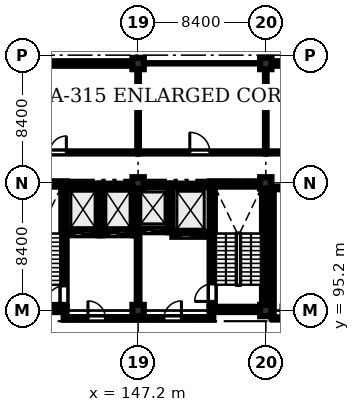
"""IFC4 building model, lengths in metres.
Left out: names, types, materials, properties, quantities, classifications, styles, units other than length and angle.
Written with IfcOpenShell. Run it as: python <this file> out.ifc"""

import sys

from ifc_helpers import new_model, si_unit, direction, frame, frame_2d, origin, origin_2d, place, context, subcontext, project, spatial, rectangle, extrude, element, fill, save


model = new_model("IFC4")
c1 = context("Model", 3, precision=1e-05, world=origin(), true_north=direction((0.0, 1.0)))
c2 = subcontext(c1, "Body", "Model", "MODEL_VIEW")
j1 = project(units=[si_unit("LENGTHUNIT", "METRE"), si_unit("PLANEANGLEUNIT", "RADIAN")], contexts=[c1])
p1 = place(None, origin())
s1 = spatial("IfcSite", under=j1, at=p1, CompositionType="ELEMENT")
p2 = place(p1, origin())
s2 = spatial("IfcBuilding", under=s1, at=p2, CompositionType="ELEMENT")
p3 = place(p2, frame((0.0, 0.0, 52.8)))
s3 = spatial("IfcBuildingStorey", under=s2, at=p3, CompositionType="ELEMENT", Elevation=52.8)
for number, where, z_axis, x_axis in (
    (1, (147.2, 95.2, 0.0), (0.0, 0.0, 1.0), (1.0, 0.0, 0.0)),
    (2, (147.2, 103.6, 0.0), (0.0, 0.0, 1.0), (1.0, 0.0, 0.0)),
    (3, (147.2, 111.45, 0.0), (0.0, 0.0, 1.0), (1.0, 0.0, 0.0)),
    (4, (155.6, 95.2, 0.0), (0.0, 0.0, 1.0), (1.0, 0.0, 0.0)),
    (5, (155.6, 103.6, 0.0), (0.0, 0.0, 1.0), (1.0, 0.0, 0.0)),
    (6, (155.6, 111.45, 0.0), (0.0, 0.0, 1.0), (1.0, 0.0, 0.0)),
):
    element("IfcColumn", number, at=place(p3, frame(where, z_axis=z_axis, x_axis=x_axis)), inside=s3, PredefinedType="COLUMN", context=c2, shape_type="SweptSolid", body=[
        extrude(rectangle(XDim=0.75, YDim=0.75, at=origin_2d()), origin(), (0.0, 0.0, 1.0), 4.03),
    ])
for number, where, z_axis, x_axis in (
    (7, (138.7, 95.275, 0.0), (0.0, 0.0, 1.0), (1.0, 0.0, 0.0)),
    (8, (138.7, 103.525, 0.0), (0.0, 0.0, 1.0), (1.0, 0.0, 0.0)),
):
    element("IfcWall", number, at=place(p3, frame(where, z_axis=z_axis, x_axis=x_axis)), inside=s3, PredefinedType="SHEAR", context=c2, shape_type="SweptSolid", body=[
        extrude(rectangle(XDim=3.8, YDim=0.35, at=frame_2d((1.9, 0.0))), origin(), (0.0, 0.0, 1.0), 4.03),
    ])
p4 = place(p3, frame((142.325, 95.45, 0.0), z_axis=(0.0, 0.0, 1.0), x_axis=(0.0, 1.0, 0.0)))
e9 = element("IfcWall", 9, at=p4, inside=s3, PredefinedType="SHEAR", context=c2, shape_type="SweptSolid", body=[
    extrude(rectangle(XDim=7.9, YDim=0.35, at=frame_2d((3.95, 0.0))), origin(), (0.0, 0.0, 1.0), 4.03),
])
p5 = place(p4, frame((0.22, 0.0, 0.0)))
e10 = element("IfcOpeningElement", 10, at=p5, cuts=e9, PredefinedType="OPENING", context=c2, shape_type="SweptSolid", body=[
    extrude(rectangle(XDim=1.15, YDim=2.15, at=frame_2d((0.575, 1.075))), frame((0.0, 0.185, 0.0), z_axis=(0.0, -1.0, 0.0), x_axis=(1.0, 0.0, 0.0)), (0.0, 0.0, 1.0), 0.37),
])
for number, where, z_axis, x_axis in (
    (11, (151.9, 95.275, 0.0), (0.0, 0.0, 1.0), (1.0, 0.0, 0.0)),
    (12, (151.9, 103.525, 0.0), (0.0, 0.0, 1.0), (1.0, 0.0, 0.0)),
):
    element("IfcWall", number, at=place(p3, frame(where, z_axis=z_axis, x_axis=x_axis)), inside=s3, PredefinedType="SHEAR", context=c2, shape_type="SweptSolid", body=[
        extrude(rectangle(XDim=3.8, YDim=0.35, at=frame_2d((1.9, 0.0))), origin(), (0.0, 0.0, 1.0), 4.03),
    ])
p6 = place(p3, frame((152.075, 95.45, 0.0), z_axis=(0.0, 0.0, 1.0), x_axis=(0.0, 1.0, 0.0)))
e13 = element("IfcWall", 13, at=p6, inside=s3, PredefinedType="SHEAR", context=c2, shape_type="SweptSolid", body=[
    extrude(rectangle(XDim=7.9, YDim=0.35, at=frame_2d((3.95, 0.0))), origin(), (0.0, 0.0, 1.0), 4.03),
])
p7 = place(p6, frame((0.35, 0.0, 0.0)))
e14 = element("IfcOpeningElement", 14, at=p7, cuts=e13, PredefinedType="OPENING", context=c2, shape_type="SweptSolid", body=[
    extrude(rectangle(XDim=1.15, YDim=2.15, at=frame_2d((0.575, 1.075))), frame((0.0, 0.185, 0.0), z_axis=(0.0, -1.0, 0.0), x_axis=(1.0, 0.0, 0.0)), (0.0, 0.0, 1.0), 0.37),
])
p8 = place(p3, frame((155.525, 95.45, 0.0), z_axis=(0.0, 0.0, 1.0), x_axis=(0.0, 1.0, 0.0)))
e15 = element("IfcWall", 15, at=p8, inside=s3, PredefinedType="SHEAR", context=c2, shape_type="SweptSolid", body=[
    extrude(rectangle(XDim=7.9, YDim=0.35, at=frame_2d((3.95, 0.0))), origin(), (0.0, 0.0, 1.0), 4.03),
])
p9 = place(p3, frame((142.5, 100.275, 0.0), z_axis=(0.0, 0.0, 1.0), x_axis=(1.0, 0.0, 0.0)))
e16 = element("IfcWall", 16, at=p9, inside=s3, PredefinedType="SHEAR", context=c2, shape_type="SweptSolid", body=[
    extrude(rectangle(XDim=2.1, YDim=0.25, at=frame_2d((1.05, 0.0))), origin(), (0.0, 0.0, 1.0), 4.03),
])
p10 = place(p9, frame((0.5, 0.0, 0.0)))
e17 = element("IfcOpeningElement", 17, at=p10, cuts=e16, PredefinedType="OPENING", context=c2, shape_type="SweptSolid", body=[
    extrude(rectangle(XDim=1.1, YDim=2.15, at=frame_2d((0.55, 1.075))), frame((0.0, 0.135, 0.0), z_axis=(0.0, -1.0, 0.0), x_axis=(1.0, 0.0, 0.0)), (0.0, 0.0, 1.0), 0.27),
])
p11 = place(p3, frame((142.5, 103.425, 0.0), z_axis=(0.0, 0.0, 1.0), x_axis=(1.0, 0.0, 0.0)))
e18 = element("IfcWall", 18, at=p11, inside=s3, PredefinedType="SHEAR", context=c2, shape_type="SweptSolid", body=[
    extrude(rectangle(XDim=2.1, YDim=0.25, at=frame_2d((1.05, 0.0))), origin(), (0.0, 0.0, 1.0), 4.03),
])
p12 = place(p3, frame((144.725, 100.15, 0.0), z_axis=(0.0, 0.0, 1.0), x_axis=(0.0, 1.0, 0.0)))
e19 = element("IfcWall", 19, at=p12, inside=s3, PredefinedType="SHEAR", context=c2, shape_type="SweptSolid", body=[
    extrude(rectangle(XDim=3.4, YDim=0.25, at=frame_2d((1.7, 0.0))), origin(), (0.0, 0.0, 1.0), 4.03),
])
p13 = place(p3, frame((144.85, 100.275, 0.0), z_axis=(0.0, 0.0, 1.0), x_axis=(1.0, 0.0, 0.0)))
e20 = element("IfcWall", 20, at=p13, inside=s3, PredefinedType="SHEAR", context=c2, shape_type="SweptSolid", body=[
    extrude(rectangle(XDim=2.05, YDim=0.25, at=frame_2d((1.025, 0.0))), origin(), (0.0, 0.0, 1.0), 4.03),
])
p14 = place(p13, frame((0.465, 0.0, 0.0)))
e21 = element("IfcOpeningElement", 21, at=p14, cuts=e20, PredefinedType="OPENING", context=c2, shape_type="SweptSolid", body=[
    extrude(rectangle(XDim=1.12, YDim=2.15, at=frame_2d((0.56, 1.075))), frame((0.0, 0.135, 0.0), z_axis=(0.0, -1.0, 0.0), x_axis=(1.0, 0.0, 0.0)), (0.0, 0.0, 1.0), 0.27),
])
p15 = place(p3, frame((144.85, 103.425, 0.0), z_axis=(0.0, 0.0, 1.0), x_axis=(1.0, 0.0, 0.0)))
e22 = element("IfcWall", 22, at=p15, inside=s3, PredefinedType="SHEAR", context=c2, shape_type="SweptSolid", body=[
    extrude(rectangle(XDim=2.05, YDim=0.25, at=frame_2d((1.025, 0.0))), origin(), (0.0, 0.0, 1.0), 4.03),
])
p16 = place(p3, frame((147.025, 100.15, 0.0), z_axis=(0.0, 0.0, 1.0), x_axis=(0.0, 1.0, 0.0)))
e23 = element("IfcWall", 23, at=p16, inside=s3, PredefinedType="SHEAR", context=c2, shape_type="SweptSolid", body=[
    extrude(rectangle(XDim=3.4, YDim=0.25, at=frame_2d((1.7, 0.0))), origin(), (0.0, 0.0, 1.0), 4.03),
])
p17 = place(p3, frame((147.15, 100.475, 0.0), z_axis=(0.0, 0.0, 1.0), x_axis=(1.0, 0.0, 0.0)))
e24 = element("IfcWall", 24, at=p17, inside=s3, PredefinedType="SHEAR", context=c2, shape_type="SweptSolid", body=[
    extrude(rectangle(XDim=2.05, YDim=0.25, at=frame_2d((1.025, 0.0))), origin(), (0.0, 0.0, 1.0), 4.03),
])
p18 = place(p17, frame((0.495, 0.0, 0.0)))
e25 = element("IfcOpeningElement", 25, at=p18, cuts=e24, PredefinedType="OPENING", context=c2, shape_type="SweptSolid", body=[
    extrude(rectangle(XDim=1.06, YDim=2.15, at=frame_2d((0.53, 1.075))), frame((0.0, 0.135, 0.0), z_axis=(0.0, -1.0, 0.0), x_axis=(1.0, 0.0, 0.0)), (0.0, 0.0, 1.0), 0.27),
])
p19 = place(p3, frame((147.15, 103.425, 0.0), z_axis=(0.0, 0.0, 1.0), x_axis=(1.0, 0.0, 0.0)))
e26 = element("IfcWall", 26, at=p19, inside=s3, PredefinedType="SHEAR", context=c2, shape_type="SweptSolid", body=[
    extrude(rectangle(XDim=2.05, YDim=0.25, at=frame_2d((1.025, 0.0))), origin(), (0.0, 0.0, 1.0), 4.03),
])
p20 = place(p3, frame((149.325, 100.35, 0.0), z_axis=(0.0, 0.0, 1.0), x_axis=(0.0, 1.0, 0.0)))
e27 = element("IfcWall", 27, at=p20, inside=s3, PredefinedType="SHEAR", context=c2, shape_type="SweptSolid", body=[
    extrude(rectangle(XDim=3.2, YDim=0.25, at=frame_2d((1.6, 0.0))), origin(), (0.0, 0.0, 1.0), 4.03),
])
p21 = place(p3, frame((149.45, 100.175, 0.0), z_axis=(0.0, 0.0, 1.0), x_axis=(1.0, 0.0, 0.0)))
e28 = element("IfcWall", 28, at=p21, inside=s3, PredefinedType="SHEAR", context=c2, shape_type="SweptSolid", body=[
    extrude(rectangle(XDim=2.45, YDim=0.25, at=frame_2d((1.225, 0.0))), origin(), (0.0, 0.0, 1.0), 4.03),
])
p22 = place(p21, frame((0.575, 0.0, 0.0)))
e29 = element("IfcOpeningElement", 29, at=p22, cuts=e28, PredefinedType="OPENING", context=c2, shape_type="SweptSolid", body=[
    extrude(rectangle(XDim=1.3, YDim=2.25, at=frame_2d((0.65, 1.125))), frame((0.0, 0.135, 0.0), z_axis=(0.0, -1.0, 0.0), x_axis=(1.0, 0.0, 0.0)), (0.0, 0.0, 1.0), 0.27),
])
p23 = place(p3, frame((149.45, 103.425, 0.0), z_axis=(0.0, 0.0, 1.0), x_axis=(1.0, 0.0, 0.0)))
e30 = element("IfcWall", 30, at=p23, inside=s3, PredefinedType="SHEAR", context=c2, shape_type="SweptSolid", body=[
    extrude(rectangle(XDim=2.45, YDim=0.25, at=frame_2d((1.225, 0.0))), origin(), (0.0, 0.0, 1.0), 4.03),
])
p24 = place(p3, frame((139.175, 111.45, 0.0), z_axis=(0.0, 0.0, 1.0), x_axis=(1.0, 0.0, 0.0)))
e31 = element("IfcWall", 31, at=p24, inside=s3, PredefinedType="STANDARD", context=c2, shape_type="SweptSolid", body=[
    extrude(rectangle(XDim=7.65, YDim=0.3, at=frame_2d((3.825, 0.0))), origin(), (0.0, 0.0, 1.0), 3.33),
])
p25 = place(p24, frame((0.85, 0.0, 0.9)))
e32 = element("IfcOpeningElement", 32, at=p25, cuts=e31, PredefinedType="OPENING", context=c2, shape_type="SweptSolid", body=[
    extrude(rectangle(XDim=1.9, YDim=2.1, at=frame_2d((0.95, 1.05))), frame((0.0, 0.16, 0.0), z_axis=(0.0, -1.0, 0.0), x_axis=(1.0, 0.0, 0.0)), (0.0, 0.0, 1.0), 0.32),
])
p26 = place(p24, frame((4.65, 0.0, 0.9)))
e33 = element("IfcOpeningElement", 33, at=p26, cuts=e31, PredefinedType="OPENING", context=c2, shape_type="SweptSolid", body=[
    extrude(rectangle(XDim=1.9, YDim=2.1, at=frame_2d((0.95, 1.05))), frame((0.0, 0.16, 0.0), z_axis=(0.0, -1.0, 0.0), x_axis=(1.0, 0.0, 0.0)), (0.0, 0.0, 1.0), 0.32),
])
p27 = place(p3, frame((155.975, 111.45, 0.0), z_axis=(0.0, 0.0, 1.0), x_axis=(1.0, 0.0, 0.0)))
e34 = element("IfcWall", 34, at=p27, inside=s3, PredefinedType="STANDARD", context=c2, shape_type="SweptSolid", body=[
    extrude(rectangle(XDim=7.1, YDim=0.3, at=frame_2d((3.55, 0.0))), origin(), (0.0, 0.0, 1.0), 3.33),
])
p28 = place(p27, frame((0.85, 0.0, 0.9)))
e35 = element("IfcOpeningElement", 35, at=p28, cuts=e34, PredefinedType="OPENING", context=c2, shape_type="SweptSolid", body=[
    extrude(rectangle(XDim=1.9, YDim=2.1, at=frame_2d((0.95, 1.05))), frame((0.0, 0.16, 0.0), z_axis=(0.0, -1.0, 0.0), x_axis=(1.0, 0.0, 0.0)), (0.0, 0.0, 1.0), 0.32),
])
p29 = place(p27, frame((4.65, 0.0, 0.9)))
e36 = element("IfcOpeningElement", 36, at=p29, cuts=e34, PredefinedType="OPENING", context=c2, shape_type="SweptSolid", body=[
    extrude(rectangle(XDim=1.9, YDim=2.1, at=frame_2d((0.95, 1.05))), frame((0.0, 0.16, 0.0), z_axis=(0.0, -1.0, 0.0), x_axis=(1.0, 0.0, 0.0)), (0.0, 0.0, 1.0), 0.32),
])
p30 = place(p3, frame((142.3, 94.68, 0.0), z_axis=(0.0, 0.0, 1.0), x_axis=(1.0, 0.0, 0.0)))
e37 = element("IfcWall", 37, at=p30, inside=s3, PredefinedType="STANDARD", context=c2, shape_type="SweptSolid", body=[
    extrude(rectangle(XDim=4.8, YDim=0.18, at=frame_2d((2.4, 0.0))), origin(), (0.0, 0.0, 1.0), 4.03),
])
p31 = place(p30, frame((1.6, 0.0, 0.0)))
e38 = element("IfcOpeningElement", 38, at=p31, cuts=e37, PredefinedType="OPENING", context=c2, shape_type="SweptSolid", body=[
    extrude(rectangle(XDim=1.15, YDim=2.15, at=frame_2d((0.575, 1.075))), frame((0.0, 0.1, 0.0), z_axis=(0.0, -1.0, 0.0), x_axis=(1.0, 0.0, 0.0)), (0.0, 0.0, 1.0), 0.2),
])
p32 = place(p3, frame((147.3, 94.68, 0.0), z_axis=(0.0, 0.0, 1.0), x_axis=(1.0, 0.0, 0.0)))
e39 = element("IfcWall", 39, at=p32, inside=s3, PredefinedType="STANDARD", context=c2, shape_type="SweptSolid", body=[
    extrude(rectangle(XDim=4.85, YDim=0.18, at=frame_2d((2.425, 0.0))), origin(), (0.0, 0.0, 1.0), 4.03),
])
p33 = place(p32, frame((1.6, 0.0, 0.0)))
e40 = element("IfcOpeningElement", 40, at=p33, cuts=e39, PredefinedType="OPENING", context=c2, shape_type="SweptSolid", body=[
    extrude(rectangle(XDim=1.15, YDim=2.15, at=frame_2d((0.575, 1.075))), frame((0.0, 0.1, 0.0), z_axis=(0.0, -1.0, 0.0), x_axis=(1.0, 0.0, 0.0)), (0.0, 0.0, 1.0), 0.2),
])
p34 = place(p3, frame((147.2, 95.75, 0.0), z_axis=(0.0, 0.0, 1.0), x_axis=(0.0, 1.0, 0.0)))
e41 = element("IfcWall", 41, at=p34, inside=s3, PredefinedType="STANDARD", context=c2, shape_type="SweptSolid", body=[
    extrude(rectangle(XDim=4.5, YDim=0.18, at=frame_2d((2.25, 0.0))), origin(), (0.0, 0.0, 1.0), 3.33),
])
p35 = place(p3, frame((156.05, 94.68, 0.0), z_axis=(0.0, 0.0, 1.0), x_axis=(1.0, 0.0, 0.0)))
e42 = element("IfcWall", 42, at=p35, inside=s3, PredefinedType="PARTITIONING", context=c2, shape_type="SweptSolid", body=[
    extrude(rectangle(XDim=7.15, YDim=0.15, at=frame_2d((3.575, 0.0))), origin(), (0.0, 0.0, 1.0), 4.03),
])
p36 = place(p35, frame((0.55, 0.0, 0.0)))
e43 = element("IfcOpeningElement", 43, at=p36, cuts=e42, PredefinedType="OPENING", context=c2, shape_type="SweptSolid", body=[
    extrude(rectangle(XDim=0.98, YDim=2.12, at=frame_2d((0.49, 1.06))), frame((0.0, 0.085, 0.0), z_axis=(0.0, -1.0, 0.0), x_axis=(1.0, 0.0, 0.0)), (0.0, 0.0, 1.0), 0.17),
])
p37 = place(p3, frame((156.05, 103.25, 0.0), z_axis=(0.0, 0.0, 1.0), x_axis=(1.0, 0.0, 0.0)))
e44 = element("IfcWall", 44, at=p37, inside=s3, PredefinedType="PARTITIONING", context=c2, shape_type="SweptSolid", body=[
    extrude(rectangle(XDim=7.15, YDim=0.15, at=frame_2d((3.575, 0.0))), origin(), (0.0, 0.0, 1.0), 4.03),
])
p38 = place(p3, frame((156.05, 94.68, 0.0), z_axis=(0.0, 0.0, 1.0), x_axis=(0.0, 1.0, 0.0)))
e45 = element("IfcWall", 45, at=p38, inside=s3, PredefinedType="PARTITIONING", context=c2, shape_type="SweptSolid", body=[
    extrude(rectangle(XDim=8.57, YDim=0.15, at=frame_2d((4.285, 0.0))), origin(), (0.0, 0.0, 1.0), 4.03),
])
p39 = place(p3, frame((134.6, 105.6, 0.0), z_axis=(0.0, 0.0, 1.0), x_axis=(1.0, 0.0, 0.0)))
e46 = element("IfcWall", 46, at=p39, inside=s3, PredefinedType="PARTITIONING", context=c2, shape_type="SweptSolid", body=[
    extrude(rectangle(XDim=12.6, YDim=0.145, at=frame_2d((6.3, 0.0))), origin(), (0.0, 0.0, 1.0), 4.03),
])
p40 = place(p39, frame((6.8, 0.0, 0.0)))
e47 = element("IfcOpeningElement", 47, at=p40, cuts=e46, PredefinedType="OPENING", context=c2, shape_type="SweptSolid", body=[
    extrude(rectangle(XDim=1.08, YDim=2.15, at=frame_2d((0.54, 1.075))), frame((0.0, 0.083, 0.0), z_axis=(0.0, -1.0, 0.0), x_axis=(1.0, 0.0, 0.0)), (0.0, 0.0, 1.0), 0.165),
])
p41 = place(p3, frame((147.2, 105.6, 0.0), z_axis=(0.0, 0.0, 1.0), x_axis=(1.0, 0.0, 0.0)))
e48 = element("IfcWall", 48, at=p41, inside=s3, PredefinedType="PARTITIONING", context=c2, shape_type="SweptSolid", body=[
    extrude(rectangle(XDim=8.4, YDim=0.145, at=frame_2d((4.2, 0.0))), origin(), (0.0, 0.0, 1.0), 4.03),
])
p42 = place(p41, frame((3.4, 0.0, 0.0)))
e49 = element("IfcOpeningElement", 49, at=p42, cuts=e48, PredefinedType="OPENING", context=c2, shape_type="SweptSolid", body=[
    extrude(rectangle(XDim=1.32, YDim=2.2, at=frame_2d((0.66, 1.1))), frame((0.0, 0.083, 0.0), z_axis=(0.0, -1.0, 0.0), x_axis=(1.0, 0.0, 0.0)), (0.0, 0.0, 1.0), 0.165),
])
p43 = place(p3, frame((147.2, 105.6, 0.0), z_axis=(0.0, 0.0, 1.0), x_axis=(0.0, 1.0, 0.0)))
e50 = element("IfcWall", 50, at=p43, inside=s3, PredefinedType="PARTITIONING", context=c2, shape_type="SweptSolid", body=[
    extrude(rectangle(XDim=5.75, YDim=0.112, at=frame_2d((2.875, 0.0))), origin(), (0.0, 0.0, 1.0), 3.33),
])
p44 = place(p3, frame((155.6, 105.6, 0.0), z_axis=(0.0, 0.0, 1.0), x_axis=(1.0, 0.0, 0.0)))
e51 = element("IfcWall", 51, at=p44, inside=s3, PredefinedType="PARTITIONING", context=c2, shape_type="SweptSolid", body=[
    extrude(rectangle(XDim=7.75, YDim=0.145, at=frame_2d((3.875, 0.0))), origin(), (0.0, 0.0, 1.0), 4.03),
])
p45 = place(p44, frame((3.4, 0.0, 0.0)))
e52 = element("IfcOpeningElement", 52, at=p45, cuts=e51, PredefinedType="OPENING", context=c2, shape_type="SweptSolid", body=[
    extrude(rectangle(XDim=1.08, YDim=2.15, at=frame_2d((0.54, 1.075))), frame((0.0, 0.083, 0.0), z_axis=(0.0, -1.0, 0.0), x_axis=(1.0, 0.0, 0.0)), (0.0, 0.0, 1.0), 0.165),
])
p46 = place(p3, frame((155.6, 105.6, 0.0), z_axis=(0.0, 0.0, 1.0), x_axis=(0.0, 1.0, 0.0)))
e53 = element("IfcWall", 53, at=p46, inside=s3, PredefinedType="PARTITIONING", context=c2, shape_type="SweptSolid", body=[
    extrude(rectangle(XDim=5.75, YDim=0.112, at=frame_2d((2.875, 0.0))), origin(), (0.0, 0.0, 1.0), 3.33),
])
p47 = place(p25, origin())
e54 = element("IfcWindow", 54, at=p47, inside=s3, PartitioningType="DOUBLE_PANEL_VERTICAL", PredefinedType="WINDOW", context=c2, shape_type="SweptSolid", body=[
    extrude(rectangle(XDim=1.9, YDim=2.1, at=frame_2d((0.95, 1.05))), frame((0.0, 0.03, 0.0), z_axis=(0.0, -1.0, 0.0), x_axis=(1.0, 0.0, 0.0)), (0.0, 0.0, 1.0), 0.06),
])
fill(e32, e54)
p48 = place(p26, origin())
e55 = element("IfcWindow", 55, at=p48, inside=s3, PartitioningType="DOUBLE_PANEL_VERTICAL", PredefinedType="WINDOW", context=c2, shape_type="SweptSolid", body=[
    extrude(rectangle(XDim=1.9, YDim=2.1, at=frame_2d((0.95, 1.05))), frame((0.0, 0.03, 0.0), z_axis=(0.0, -1.0, 0.0), x_axis=(1.0, 0.0, 0.0)), (0.0, 0.0, 1.0), 0.06),
])
fill(e33, e55)
p49 = place(p31, origin())
e56 = element("IfcDoor", 56, at=p49, inside=s3, OperationType="SINGLE_SWING_LEFT", PredefinedType="DOOR", context=c2, shape_type="SweptSolid", body=[
    extrude(rectangle(XDim=1.15, YDim=2.15, at=frame_2d((0.575, 1.075))), frame((0.0, 0.025, 0.0), z_axis=(0.0, -1.0, 0.0), x_axis=(1.0, 0.0, 0.0)), (0.0, 0.0, 1.0), 0.05),
])
fill(e38, e56)
p50 = place(p33, origin())
e57 = element("IfcDoor", 57, at=p50, inside=s3, OperationType="SINGLE_SWING_RIGHT", PredefinedType="DOOR", context=c2, shape_type="SweptSolid", body=[
    extrude(rectangle(XDim=1.15, YDim=2.15, at=frame_2d((0.575, 1.075))), frame((0.0, 0.025, 0.0), z_axis=(0.0, -1.0, 0.0), x_axis=(1.0, 0.0, 0.0)), (0.0, 0.0, 1.0), 0.05),
])
fill(e40, e57)
p51 = place(p40, origin())
e58 = element("IfcDoor", 58, at=p51, inside=s3, OperationType="SINGLE_SWING_RIGHT", PredefinedType="DOOR", context=c2, shape_type="SweptSolid", body=[
    extrude(rectangle(XDim=1.08, YDim=2.15, at=frame_2d((0.54, 1.075))), frame((0.0, 0.025, 0.0), z_axis=(0.0, -1.0, 0.0), x_axis=(1.0, 0.0, 0.0)), (0.0, 0.0, 1.0), 0.05),
])
fill(e47, e58)
p52 = place(p42, origin())
e59 = element("IfcDoor", 59, at=p52, inside=s3, OperationType="SINGLE_SWING_LEFT", PredefinedType="DOOR", context=c2, shape_type="SweptSolid", body=[
    extrude(rectangle(XDim=1.32, YDim=2.2, at=frame_2d((0.66, 1.1))), frame((0.0, 0.025, 0.0), z_axis=(0.0, -1.0, 0.0), x_axis=(1.0, 0.0, 0.0)), (0.0, 0.0, 1.0), 0.05),
])
fill(e49, e59)
p53 = place(p5, origin())
e60 = element("IfcDoor", 60, at=p53, inside=s3, OperationType="SINGLE_SWING_LEFT", PredefinedType="DOOR", context=c2, shape_type="SweptSolid", body=[
    extrude(rectangle(XDim=1.15, YDim=2.15, at=frame_2d((0.575, 1.075))), frame((0.0, 0.025, 0.0), z_axis=(0.0, -1.0, 0.0), x_axis=(1.0, 0.0, 0.0)), (0.0, 0.0, 1.0), 0.05),
])
fill(e10, e60)
p54 = place(p7, origin())
e61 = element("IfcDoor", 61, at=p54, inside=s3, OperationType="SINGLE_SWING_LEFT", PredefinedType="DOOR", context=c2, shape_type="SweptSolid", body=[
    extrude(rectangle(XDim=1.15, YDim=2.15, at=frame_2d((0.575, 1.075))), frame((0.0, 0.025, 0.0), z_axis=(0.0, -1.0, 0.0), x_axis=(1.0, 0.0, 0.0)), (0.0, 0.0, 1.0), 0.05),
])
fill(e14, e61)
p55 = place(p10, origin())
e62 = element("IfcDoor", 62, at=p55, inside=s3, OperationType="SLIDING_TO_LEFT", PredefinedType="DOOR", context=c2, shape_type="SweptSolid", body=[
    extrude(rectangle(XDim=1.1, YDim=2.15, at=frame_2d((0.55, 1.075))), frame((0.0, 0.025, 0.0), z_axis=(0.0, -1.0, 0.0), x_axis=(1.0, 0.0, 0.0)), (0.0, 0.0, 1.0), 0.05),
])
fill(e17, e62)
p56 = place(p14, origin())
e63 = element("IfcDoor", 63, at=p56, inside=s3, OperationType="SLIDING_TO_LEFT", PredefinedType="DOOR", context=c2, shape_type="SweptSolid", body=[
    extrude(rectangle(XDim=1.12, YDim=2.15, at=frame_2d((0.56, 1.075))), frame((0.0, 0.025, 0.0), z_axis=(0.0, -1.0, 0.0), x_axis=(1.0, 0.0, 0.0)), (0.0, 0.0, 1.0), 0.05),
])
fill(e21, e63)
p57 = place(p18, origin())
e64 = element("IfcDoor", 64, at=p57, inside=s3, OperationType="SLIDING_TO_LEFT", PredefinedType="DOOR", context=c2, shape_type="SweptSolid", body=[
    extrude(rectangle(XDim=1.06, YDim=2.15, at=frame_2d((0.53, 1.075))), frame((0.0, 0.025, 0.0), z_axis=(0.0, -1.0, 0.0), x_axis=(1.0, 0.0, 0.0)), (0.0, 0.0, 1.0), 0.05),
])
fill(e25, e64)
p58 = place(p22, origin())
e65 = element("IfcDoor", 65, at=p58, inside=s3, OperationType="SLIDING_TO_LEFT", PredefinedType="DOOR", context=c2, shape_type="SweptSolid", body=[
    extrude(rectangle(XDim=1.3, YDim=2.25, at=frame_2d((0.65, 1.125))), frame((0.0, 0.025, 0.0), z_axis=(0.0, -1.0, 0.0), x_axis=(1.0, 0.0, 0.0)), (0.0, 0.0, 1.0), 0.05),
])
fill(e29, e65)
save(model, sys.argv[1])
